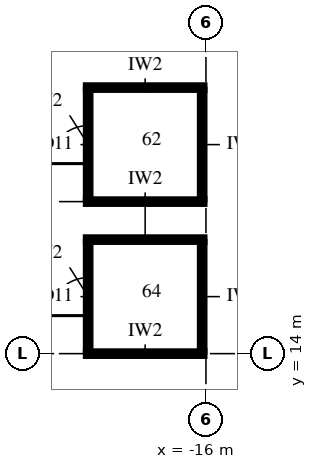
"""IFC4 building model, lengths in metres.
Left out: names, types, materials, properties, quantities, classifications, styles, units other than length and angle.
Written with IfcOpenShell. Run it as: python <this file> out.ifc"""

import sys

from ifc_helpers import new_model, si_unit, direction, frame, frame_2d, origin, place, context, subcontext, project, spatial, rectangle, extrude, element, fill, save


model = new_model("IFC4")
c1 = context("Model", 3, precision=1e-05, world=origin(), true_north=direction((0.0, 1.0)))
c2 = subcontext(c1, "Body", "Model", "MODEL_VIEW")
j1 = project(units=[si_unit("LENGTHUNIT", "METRE"), si_unit("PLANEANGLEUNIT", "RADIAN")], contexts=[c1])
p1 = place(None, origin())
s1 = spatial("IfcSite", under=j1, at=p1, CompositionType="ELEMENT")
p2 = place(p1, origin())
s2 = spatial("IfcBuilding", under=s1, at=p2, CompositionType="ELEMENT")
p3 = place(p2, frame((0.0, 0.0, 214.0)))
s3 = spatial("IfcBuildingStorey", under=s2, at=p3, CompositionType="ELEMENT", Elevation=214.0)
for number, where, z_axis, x_axis in (
    (1, (-19.16, 14.0, 0.0), (0.0, 0.0, 1.0), (1.0, 0.0, 0.0)),
    (2, (-19.16, 17.0, 0.0), (0.0, 0.0, 1.0), (1.0, 0.0, 0.0)),
):
    element("IfcWall", number, at=place(p3, frame(where, z_axis=z_axis, x_axis=x_axis)), inside=s3, PredefinedType="PARTITIONING", context=c2, shape_type="SweptSolid", body=[
        extrude(rectangle(XDim=3.12, YDim=0.12, at=frame_2d((1.56, 0.0))), origin(), (0.0, 0.0, 1.0), 3.85),
    ])
for number, where, z_axis, x_axis in (
    (3, (-19.16, 18.0, 0.0), (0.0, 0.0, 1.0), (1.0, 0.0, 0.0)),
    (4, (-19.16, 21.0, 0.0), (0.0, 0.0, 1.0), (1.0, 0.0, 0.0)),
):
    element("IfcWall", number, at=place(p3, frame(where, z_axis=z_axis, x_axis=x_axis)), inside=s3, PredefinedType="PARTITIONING", context=c2, shape_type="SweptSolid", body=[
        extrude(rectangle(XDim=3.12, YDim=0.12, at=frame_2d((1.56, 0.0))), origin(), (0.0, 0.0, 1.0), 3.25),
    ])
p4 = place(p3, frame((-19.1, 14.06, 0.0), z_axis=(0.0, 0.0, 1.0), x_axis=(0.0, 1.0, 0.0)))
e5 = element("IfcWall", 5, at=p4, inside=s3, PredefinedType="PARTITIONING", context=c2, shape_type="SweptSolid", body=[
    extrude(rectangle(XDim=2.88, YDim=0.12, at=frame_2d((1.44, 0.0))), origin(), (0.0, 0.0, 1.0), 3.25),
])
p5 = place(p4, frame((0.94, 0.0, 0.0)))
e6 = element("IfcOpeningElement", 6, at=p5, cuts=e5, PredefinedType="OPENING", context=c2, shape_type="SweptSolid", body=[
    extrude(rectangle(XDim=1.0, YDim=2.4, at=frame_2d((0.5, 1.2))), frame((0.0, 0.075, 0.0), z_axis=(0.0, -1.0, 0.0), x_axis=(1.0, 0.0, 0.0)), (0.0, 0.0, 1.0), 0.15),
])
p6 = place(p3, frame((-19.1, 18.06, 0.0), z_axis=(0.0, 0.0, 1.0), x_axis=(0.0, 1.0, 0.0)))
e7 = element("IfcWall", 7, at=p6, inside=s3, PredefinedType="PARTITIONING", context=c2, shape_type="SweptSolid", body=[
    extrude(rectangle(XDim=2.88, YDim=0.12, at=frame_2d((1.44, 0.0))), origin(), (0.0, 0.0, 1.0), 3.85),
])
p7 = place(p6, frame((0.94, 0.0, 0.0)))
e8 = element("IfcOpeningElement", 8, at=p7, cuts=e7, PredefinedType="OPENING", context=c2, shape_type="SweptSolid", body=[
    extrude(rectangle(XDim=1.0, YDim=2.4, at=frame_2d((0.5, 1.2))), frame((0.0, 0.075, 0.0), z_axis=(0.0, -1.0, 0.0), x_axis=(1.0, 0.0, 0.0)), (0.0, 0.0, 1.0), 0.15),
])
p8 = place(p3, frame((-16.1, 14.06, 0.0), z_axis=(0.0, 0.0, 1.0), x_axis=(0.0, 1.0, 0.0)))
e9 = element("IfcWall", 9, at=p8, inside=s3, PredefinedType="PARTITIONING", context=c2, shape_type="SweptSolid", body=[
    extrude(rectangle(XDim=2.88, YDim=0.12, at=frame_2d((1.44, 0.0))), origin(), (0.0, 0.0, 1.0), 3.25),
])
p9 = place(p3, frame((-16.1, 18.06, 0.0), z_axis=(0.0, 0.0, 1.0), x_axis=(0.0, 1.0, 0.0)))
e10 = element("IfcWall", 10, at=p9, inside=s3, PredefinedType="PARTITIONING", context=c2, shape_type="SweptSolid", body=[
    extrude(rectangle(XDim=2.88, YDim=0.12, at=frame_2d((1.44, 0.0))), origin(), (0.0, 0.0, 1.0), 3.85),
])
p10 = place(p5, origin())
e11 = element("IfcDoor", 11, at=p10, inside=s3, OperationType="SINGLE_SWING_RIGHT", PredefinedType="DOOR", context=c2, shape_type="SweptSolid", body=[
    extrude(rectangle(XDim=1.0, YDim=2.4, at=frame_2d((0.5, 1.2))), frame((0.0, 0.06, 0.0), z_axis=(0.0, -1.0, 0.0), x_axis=(1.0, 0.0, 0.0)), (0.0, 0.0, 1.0), 0.12),
])
fill(e6, e11)
p11 = place(p7, origin())
e12 = element("IfcDoor", 12, at=p11, inside=s3, OperationType="SINGLE_SWING_RIGHT", PredefinedType="DOOR", context=c2, shape_type="SweptSolid", body=[
    extrude(rectangle(XDim=1.0, YDim=2.4, at=frame_2d((0.5, 1.2))), frame((0.0, 0.06, 0.0), z_axis=(0.0, -1.0, 0.0), x_axis=(1.0, 0.0, 0.0)), (0.0, 0.0, 1.0), 0.12),
])
fill(e8, e12)
save(model, sys.argv[1])
